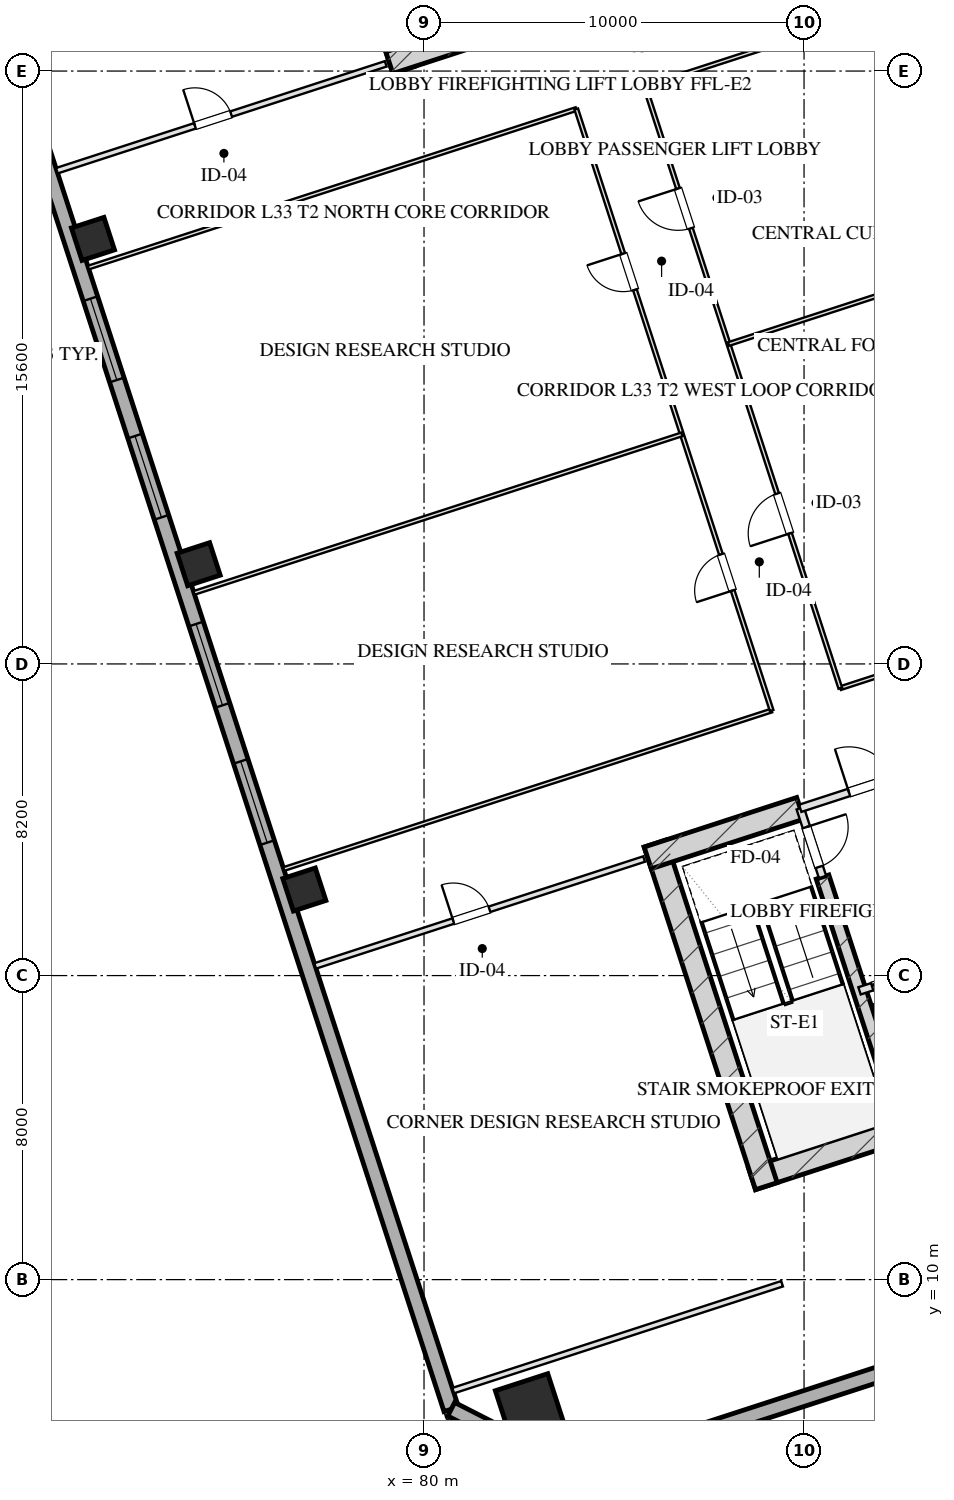
"""IFC4 building model, lengths in metres.
Left out: names, types, materials, properties, quantities, classifications, styles, units other than length and angle.
Written with IfcOpenShell. Run it as: python <this file> out.ifc"""

import sys

from ifc_helpers import new_model, si_unit, direction, frame, frame_2d, origin, origin_2d, place, context, subcontext, project, spatial, rectangle, hollow_rectangle, extrude, element, fill, save


model = new_model("IFC4")
c1 = context("Model", 3, precision=1e-05, world=origin(), true_north=direction((0.0, 1.0)))
c2 = subcontext(c1, "Body", "Model", "MODEL_VIEW")
j1 = project(units=[si_unit("LENGTHUNIT", "METRE"), si_unit("PLANEANGLEUNIT", "RADIAN")], contexts=[c1])
p1 = place(None, origin())
s1 = spatial("IfcSite", under=j1, at=p1, CompositionType="ELEMENT")
p2 = place(p1, origin())
s2 = spatial("IfcBuilding", under=s1, at=p2, CompositionType="ELEMENT")
p3 = place(p2, frame((0.0, 0.0, 127.65)))
s3 = spatial("IfcBuildingStorey", under=s2, at=p3, CompositionType="ELEMENT", Elevation=127.65)
p4 = place(p3, frame((88.63, 12.652, 0.0), z_axis=(0.0, 0.0, 1.0), x_axis=(0.95105714907, 0.309015046886, 0.0)))
e1 = element("IfcWall", 1, at=p4, inside=s3, PredefinedType="SHEAR", context=c2, shape_type="SweptSolid", body=[
    extrude(rectangle(XDim=16.4, YDim=0.6, at=frame_2d((8.2, 0.0))), origin(), (0.0, 0.0, 1.0), 3.45),
])
p5 = place(p3, frame((86.078, 21.475, 0.0), z_axis=(0.0, 0.0, 1.0), x_axis=(0.309017938678, -0.951056209472, 0.0)))
e2 = element("IfcWall", 2, at=p5, inside=s3, PredefinedType="SHEAR", context=c2, shape_type="SweptSolid", body=[
    extrude(rectangle(XDim=9.48, YDim=0.6, at=frame_2d((4.74, 0.0))), origin(), (0.0, 0.0, 1.0), 3.45),
])
p6 = place(p3, frame((90.486, 20.594, 0.0), z_axis=(0.0, 0.0, 1.0), x_axis=(0.309020428229, -0.951055400562, 0.0)))
e3 = element("IfcWall", 3, at=p6, inside=s3, PredefinedType="SHEAR", context=c2, shape_type="SweptSolid", body=[
    extrude(rectangle(XDim=6.98, YDim=0.35, at=frame_2d((3.49, 0.0))), origin(), (0.0, 0.0, 1.0), 3.45),
])
p7 = place(p3, frame((85.886, 21.097, 0.0), z_axis=(0.0, 0.0, 1.0), x_axis=(0.951068073652, 0.308981422225, 0.0)))
e4 = element("IfcWall", 4, at=p7, inside=s3, PredefinedType="SHEAR", context=c2, shape_type="SweptSolid", body=[
    extrude(rectangle(XDim=4.22, YDim=0.6, at=frame_2d((2.11, 0.0))), origin(), (0.0, 0.0, 1.0), 3.45),
])
p8 = place(p3, frame((79.466, 41.828, 0.0), z_axis=(0.0, 0.0, 1.0), x_axis=(-0.309041232772, 0.951048640421, 0.0)))
e5 = element("IfcWall", 5, at=p8, inside=s3, PredefinedType="SHEAR", context=c2, shape_type="SweptSolid", body=[
    extrude(rectangle(XDim=9.48, YDim=0.6, at=frame_2d((4.74, 0.0))), origin(), (0.0, 0.0, 1.0), 3.45),
])
p9 = place(p3, frame((79.087, 42.021, 0.0), z_axis=(0.0, 0.0, 1.0), x_axis=(0.951062550203, 0.3089984233, 0.0)))
e6 = element("IfcWall", 6, at=p9, inside=s3, PredefinedType="SHEAR", context=c2, shape_type="SweptSolid", body=[
    extrude(rectangle(XDim=4.22, YDim=0.6, at=frame_2d((2.11, 0.0))), origin(), (0.0, 0.0, 1.0), 3.45),
])
p10 = place(p3, frame((82.791, 6.612, 0.0), z_axis=(0.0, 0.0, 1.0), x_axis=(0.951056516295, 0.309016994375, 0.0)))
e7 = element("IfcColumn", 7, at=p10, inside=s3, PredefinedType="COLUMN", context=c2, shape_type="SweptSolid", body=[
    extrude(hollow_rectangle(XDim=1.45, YDim=1.45, WallThickness=0.05, at=origin_2d()), origin(), (0.0, 0.0, 1.0), 3.451),
])
for number, where, z_axis, x_axis in (
    (8, (76.851, 20.264, 0.0), (0.0, 0.0, 1.0), (0.951, 0.309, 0.0)),
    (9, (74.07, 28.824, 0.0), (0.0, 0.0, 1.0), (0.951, 0.309, 0.0)),
    (10, (71.289, 37.384, 0.0), (0.0, 0.0, 1.0), (0.951, 0.309, 0.0)),
):
    element("IfcColumn", number, at=place(p3, frame(where, z_axis=z_axis, x_axis=x_axis)), inside=s3, PredefinedType="COLUMN", context=c2, shape_type="SweptSolid", body=[
        extrude(hollow_rectangle(XDim=0.9, YDim=0.9, WallThickness=0.032, at=origin_2d()), origin(), (0.0, 0.0, 1.0), 3.451),
    ])
p11 = place(p3, frame((80.716, 6.59, 0.0), z_axis=(0.0, 0.0, 1.0), x_axis=(-0.309017542002, 0.95105633836, 0.0)))
e11 = element("IfcWall", 11, at=p11, inside=s3, PredefinedType="SOLIDWALL", context=c2, shape_type="SweptSolid", body=[
    extrude(rectangle(XDim=46.4, YDim=0.4, at=frame_2d((23.2, 0.0))), origin(), (0.0, 0.0, 1.0), 2.61),
])
p12 = place(p11, frame((15.675, 0.0, 0.75)))
e12 = element("IfcOpeningElement", 12, at=p12, cuts=e11, PredefinedType="OPENING", context=c2, shape_type="SweptSolid", body=[
    extrude(rectangle(XDim=2.25, YDim=1.46, at=frame_2d((1.125, 0.73))), frame((0.0, 0.21, 0.0), z_axis=(0.0, -1.0, 0.0), x_axis=(1.0, 0.0, 0.0)), (0.0, 0.0, 1.0), 0.42),
])
p13 = place(p11, frame((19.475, 0.0, 0.75)))
e13 = element("IfcOpeningElement", 13, at=p13, cuts=e11, PredefinedType="OPENING", context=c2, shape_type="SweptSolid", body=[
    extrude(rectangle(XDim=2.25, YDim=1.46, at=frame_2d((1.125, 0.73))), frame((0.0, 0.21, 0.0), z_axis=(0.0, -1.0, 0.0), x_axis=(1.0, 0.0, 0.0)), (0.0, 0.0, 1.0), 0.42),
])
p14 = place(p11, frame((24.675, 0.0, 0.75)))
e14 = element("IfcOpeningElement", 14, at=p14, cuts=e11, PredefinedType="OPENING", context=c2, shape_type="SweptSolid", body=[
    extrude(rectangle(XDim=2.25, YDim=1.46, at=frame_2d((1.125, 0.73))), frame((0.0, 0.21, 0.0), z_axis=(0.0, -1.0, 0.0), x_axis=(1.0, 0.0, 0.0)), (0.0, 0.0, 1.0), 0.42),
])
p15 = place(p11, frame((28.475, 0.0, 0.75)))
e15 = element("IfcOpeningElement", 15, at=p15, cuts=e11, PredefinedType="OPENING", context=c2, shape_type="SweptSolid", body=[
    extrude(rectangle(XDim=2.25, YDim=1.46, at=frame_2d((1.125, 0.73))), frame((0.0, 0.21, 0.0), z_axis=(0.0, -1.0, 0.0), x_axis=(1.0, 0.0, 0.0)), (0.0, 0.0, 1.0), 0.42),
])
p16 = place(p3, frame((111.953, 14.005, 0.0), z_axis=(0.0, 0.0, 1.0), x_axis=(-0.95105505922, -0.309021478754, 0.0)))
e16 = element("IfcWall", 16, at=p16, inside=s3, PredefinedType="SOLIDWALL", context=c2, shape_type="SweptSolid", body=[
    extrude(rectangle(XDim=29.4, YDim=0.4, at=frame_2d((14.7, 0.0))), origin(), (0.0, 0.0, 1.0), 2.61),
])
p17 = place(p3, frame((83.992, 4.92, 0.0), z_axis=(0.0, 0.0, 1.0), x_axis=(-0.891001999643, 0.45399937955, 0.0)))
e17 = element("IfcWall", 17, at=p17, inside=s3, PredefinedType="SOLIDWALL", context=c2, shape_type="SweptSolid", body=[
    extrude(rectangle(XDim=3.677, YDim=0.4, at=frame_2d((1.839, 0.0))), origin(), (0.0, 0.0, 1.0), 2.61),
])
p18 = place(p3, frame((89.899, 22.401, 0.0), z_axis=(0.0, 0.0, 1.0), x_axis=(0.308932062672, -0.951084108086, 0.0)))
e18 = element("IfcWall", 18, at=p18, inside=s3, PredefinedType="PARTITIONING", context=c2, shape_type="SweptSolid", body=[
    extrude(rectangle(XDim=1.9, YDim=0.2, at=frame_2d((0.95, 0.0))), origin(), (0.0, 0.0, 1.0), 3.175),
])
p19 = place(p18, frame((0.52, 0.0, 0.0)))
e19 = element("IfcOpeningElement", 19, at=p19, cuts=e18, PredefinedType="OPENING", context=c2, shape_type="SweptSolid", body=[
    extrude(rectangle(XDim=1.1, YDim=2.05, at=frame_2d((0.55, 1.025))), frame((0.0, 0.11, 0.0), z_axis=(0.0, -1.0, 0.0), x_axis=(1.0, 0.0, 0.0)), (0.0, 0.0, 1.0), 0.22),
])
p20 = place(p3, frame((89.899, 22.401, 0.0), z_axis=(0.0, 0.0, 1.0), x_axis=(0.951046716504, 0.309047153403, 0.0)))
e20 = element("IfcWall", 20, at=p20, inside=s3, PredefinedType="PARTITIONING", context=c2, shape_type="SweptSolid", body=[
    extrude(rectangle(XDim=3.83, YDim=0.2, at=frame_2d((1.915, 0.0))), origin(), (0.0, 0.0, 1.0), 3.175),
])
p21 = place(p20, frame((1.35, 0.0, 0.0)))
e21 = element("IfcOpeningElement", 21, at=p21, cuts=e20, PredefinedType="OPENING", context=c2, shape_type="SweptSolid", body=[
    extrude(rectangle(XDim=1.2, YDim=2.05, at=frame_2d((0.6, 1.025))), frame((0.0, 0.11, 0.0), z_axis=(0.0, -1.0, 0.0), x_axis=(1.0, 0.0, 0.0)), (0.0, 0.0, 1.0), 0.22),
])
p22 = place(p3, frame((91.46, 17.598, 0.0), z_axis=(0.0, 0.0, 1.0), x_axis=(0.951062257173, 0.308999325213, 0.0)))
e22 = element("IfcWall", 22, at=p22, inside=s3, PredefinedType="PARTITIONING", context=c2, shape_type="SweptSolid", body=[
    extrude(rectangle(XDim=2.1, YDim=0.2, at=frame_2d((1.05, 0.0))), origin(), (0.0, 0.0, 1.0), 3.175),
])
p23 = place(p22, frame((0.35, 0.0, 0.0)))
e23 = element("IfcOpeningElement", 23, at=p23, cuts=e22, PredefinedType="OPENING", context=c2, shape_type="SweptSolid", body=[
    extrude(rectangle(XDim=1.1, YDim=2.05, at=frame_2d((0.55, 1.025))), frame((0.0, 0.11, 0.0), z_axis=(0.0, -1.0, 0.0), x_axis=(1.0, 0.0, 0.0)), (0.0, 0.0, 1.0), 0.22),
])
p24 = place(p3, frame((80.767, 7.079, 0.0), z_axis=(0.0, 0.0, 1.0), x_axis=(0.951057133767, 0.309015093986, 0.0)))
e24 = element("IfcWall", 24, at=p24, inside=s3, PredefinedType="PARTITIONING", context=c2, shape_type="SweptSolid", body=[
    extrude(rectangle(XDim=9.1, YDim=0.15, at=frame_2d((4.55, 0.0))), origin(), (0.0, 0.0, 1.0), 3.175),
])
p25 = place(p3, frame((77.136, 18.254, 0.0), z_axis=(0.0, 0.0, 1.0), x_axis=(0.951057133767, 0.309015093986, 0.0)))
e25 = element("IfcWall", 25, at=p25, inside=s3, PredefinedType="PARTITIONING", context=c2, shape_type="SweptSolid", body=[
    extrude(rectangle(XDim=9.1, YDim=0.15, at=frame_2d((4.55, 0.0))), origin(), (0.0, 0.0, 1.0), 3.175),
])
p26 = place(p25, frame((3.822, 0.0, 0.0)))
e26 = element("IfcOpeningElement", 26, at=p26, cuts=e25, PredefinedType="OPENING", context=c2, shape_type="SweptSolid", body=[
    extrude(rectangle(XDim=1.0, YDim=2.05, at=frame_2d((0.5, 1.025))), frame((0.0, 0.085, 0.0), z_axis=(0.0, -1.0, 0.0), x_axis=(1.0, 0.0, 0.0)), (0.0, 0.0, 1.0), 0.17),
])
p27 = place(p3, frame((70.338, 39.177, 0.0), z_axis=(0.0, 0.0, 1.0), x_axis=(0.951059695568, 0.309007209409, 0.0)))
e27 = element("IfcWall", 27, at=p27, inside=s3, PredefinedType="PARTITIONING", context=c2, shape_type="SweptSolid", body=[
    extrude(rectangle(XDim=9.1, YDim=0.15, at=frame_2d((4.55, 0.0))), origin(), (0.0, 0.0, 1.0), 3.175),
])
p28 = place(p27, frame((3.822, 0.0, 0.0)))
e28 = element("IfcOpeningElement", 28, at=p28, cuts=e27, PredefinedType="OPENING", context=c2, shape_type="SweptSolid", body=[
    extrude(rectangle(XDim=1.0, YDim=2.05, at=frame_2d((0.5, 1.025))), frame((0.0, 0.085, 0.0), z_axis=(0.0, -1.0, 0.0), x_axis=(1.0, 0.0, 0.0)), (0.0, 0.0, 1.0), 0.17),
])
p29 = place(p3, frame((76.308, 20.803, 0.0), z_axis=(0.0, 0.0, 1.0), x_axis=(0.951054001411, 0.309024734286, 0.0)))
e29 = element("IfcWall", 29, at=p29, inside=s3, PredefinedType="MOVABLE", context=c2, shape_type="SweptSolid", body=[
    extrude(rectangle(XDim=13.5, YDim=0.1, at=frame_2d((6.75, 0.0))), origin(), (0.0, 0.0, 1.0), 3.175),
])
p30 = place(p3, frame((90.954, 25.562, 0.0), z_axis=(0.0, 0.0, 1.0), x_axis=(0.951052398814, 0.309029666393, 0.0)))
e30 = element("IfcWall", 30, at=p30, inside=s3, PredefinedType="MOVABLE", context=c2, shape_type="SweptSolid", body=[
    extrude(rectangle(XDim=9.2, YDim=0.1, at=frame_2d((4.6, 0.0))), origin(), (0.0, 0.0, 1.0), 3.175),
])
p31 = place(p3, frame((71.166, 36.629, 0.0), z_axis=(0.0, 0.0, 1.0), x_axis=(0.951057589409, 0.309013691651, 0.0)))
e31 = element("IfcWall", 31, at=p31, inside=s3, PredefinedType="MOVABLE", context=c2, shape_type="SweptSolid", body=[
    extrude(rectangle(XDim=13.5, YDim=0.1, at=frame_2d((6.75, 0.0))), origin(), (0.0, 0.0, 1.0), 3.175),
])
p32 = place(p3, frame((85.812, 41.387, 0.0), z_axis=(0.0, 0.0, 1.0), x_axis=(0.951054933035, 0.309021867106, 0.0)))
e32 = element("IfcWall", 32, at=p32, inside=s3, PredefinedType="MOVABLE", context=c2, shape_type="SweptSolid", body=[
    extrude(rectangle(XDim=9.2, YDim=0.1, at=frame_2d((4.6, 0.0))), origin(), (0.0, 0.0, 1.0), 3.175),
])
p33 = place(p3, frame((89.147, 24.975, 0.0), z_axis=(0.0, 0.0, 1.0), x_axis=(-0.309022042254, 0.951054876125, 0.0)))
e33 = element("IfcWall", 33, at=p33, inside=s3, PredefinedType="MOVABLE", context=c2, shape_type="SweptSolid", body=[
    extrude(rectangle(XDim=16.64, YDim=0.1, at=frame_2d((8.32, 0.0))), origin(), (0.0, 0.0, 1.0), 3.175),
])
p34 = place(p33, frame((3.32, 0.0, 0.0)))
e34 = element("IfcOpeningElement", 34, at=p34, cuts=e33, PredefinedType="OPENING", context=c2, shape_type="SweptSolid", body=[
    extrude(rectangle(XDim=1.0, YDim=2.05, at=frame_2d((0.5, 1.025))), frame((0.0, 0.06, 0.0), z_axis=(0.0, -1.0, 0.0), x_axis=(1.0, 0.0, 0.0)), (0.0, 0.0, 1.0), 0.12),
])
p35 = place(p33, frame((11.64, 0.0, 0.0)))
e35 = element("IfcOpeningElement", 35, at=p35, cuts=e33, PredefinedType="OPENING", context=c2, shape_type="SweptSolid", body=[
    extrude(rectangle(XDim=1.0, YDim=2.05, at=frame_2d((0.5, 1.025))), frame((0.0, 0.06, 0.0), z_axis=(0.0, -1.0, 0.0), x_axis=(1.0, 0.0, 0.0)), (0.0, 0.0, 1.0), 0.12),
])
p36 = place(p3, frame((90.954, 25.562, 0.0), z_axis=(0.0, 0.0, 1.0), x_axis=(-0.30901773025, 0.951056277195, 0.0)))
e36 = element("IfcWall", 36, at=p36, inside=s3, PredefinedType="MOVABLE", context=c2, shape_type="SweptSolid", body=[
    extrude(rectangle(XDim=16.64, YDim=0.1, at=frame_2d((8.32, 0.0))), origin(), (0.0, 0.0, 1.0), 3.175),
])
p37 = place(p36, frame((4.284, 0.0, 0.0)))
e37 = element("IfcOpeningElement", 37, at=p37, cuts=e36, PredefinedType="OPENING", context=c2, shape_type="SweptSolid", body=[
    extrude(rectangle(XDim=1.1, YDim=2.05, at=frame_2d((0.55, 1.025))), frame((0.0, 0.06, 0.0), z_axis=(0.0, -1.0, 0.0), x_axis=(1.0, 0.0, 0.0)), (0.0, 0.0, 1.0), 0.12),
])
p38 = place(p36, frame((12.724, 0.0, 0.0)))
e38 = element("IfcOpeningElement", 38, at=p38, cuts=e36, PredefinedType="OPENING", context=c2, shape_type="SweptSolid", body=[
    extrude(rectangle(XDim=1.1, YDim=2.05, at=frame_2d((0.55, 1.025))), frame((0.0, 0.06, 0.0), z_axis=(0.0, -1.0, 0.0), x_axis=(1.0, 0.0, 0.0)), (0.0, 0.0, 1.0), 0.12),
])
p39 = place(p3, frame((88.012, 34.616, 0.0), z_axis=(0.0, 0.0, 1.0), x_axis=(0.951054933035, 0.309021867106, 0.0)))
e39 = element("IfcWall", 39, at=p39, inside=s3, PredefinedType="MOVABLE", context=c2, shape_type="SweptSolid", body=[
    extrude(rectangle(XDim=9.2, YDim=0.1, at=frame_2d((4.6, 0.0))), origin(), (0.0, 0.0, 1.0), 3.175),
])
p40 = place(p3, frame((73.947, 28.069, 0.0), z_axis=(0.0, 0.0, 1.0), x_axis=(0.951059316265, 0.309008376821, 0.0)))
e40 = element("IfcWall", 40, at=p40, inside=s3, PredefinedType="MOVABLE", context=c2, shape_type="SweptSolid", body=[
    extrude(rectangle(XDim=13.5, YDim=0.1, at=frame_2d((6.75, 0.0))), origin(), (0.0, 0.0, 1.0), 3.175),
])
p41 = place(p12, origin())
e41 = element("IfcWindow", 41, at=p41, inside=s3, PartitioningType="TRIPLE_PANEL_VERTICAL", PredefinedType="WINDOW", context=c2, shape_type="SweptSolid", body=[
    extrude(rectangle(XDim=2.25, YDim=1.46, at=frame_2d((1.125, 0.73))), frame((0.0, 0.03, 0.0), z_axis=(0.0, -1.0, 0.0), x_axis=(1.0, 0.0, 0.0)), (0.0, 0.0, 1.0), 0.06),
])
fill(e12, e41)
p42 = place(p13, origin())
e42 = element("IfcWindow", 42, at=p42, inside=s3, PartitioningType="TRIPLE_PANEL_VERTICAL", PredefinedType="WINDOW", context=c2, shape_type="SweptSolid", body=[
    extrude(rectangle(XDim=2.25, YDim=1.46, at=frame_2d((1.125, 0.73))), frame((0.0, 0.03, 0.0), z_axis=(0.0, -1.0, 0.0), x_axis=(1.0, 0.0, 0.0)), (0.0, 0.0, 1.0), 0.06),
])
fill(e13, e42)
p43 = place(p14, origin())
e43 = element("IfcWindow", 43, at=p43, inside=s3, PartitioningType="TRIPLE_PANEL_VERTICAL", PredefinedType="WINDOW", context=c2, shape_type="SweptSolid", body=[
    extrude(rectangle(XDim=2.25, YDim=1.46, at=frame_2d((1.125, 0.73))), frame((0.0, 0.03, 0.0), z_axis=(0.0, -1.0, 0.0), x_axis=(1.0, 0.0, 0.0)), (0.0, 0.0, 1.0), 0.06),
])
fill(e14, e43)
p44 = place(p15, origin())
e44 = element("IfcWindow", 44, at=p44, inside=s3, PartitioningType="TRIPLE_PANEL_VERTICAL", PredefinedType="WINDOW", context=c2, shape_type="SweptSolid", body=[
    extrude(rectangle(XDim=2.25, YDim=1.46, at=frame_2d((1.125, 0.73))), frame((0.0, 0.03, 0.0), z_axis=(0.0, -1.0, 0.0), x_axis=(1.0, 0.0, 0.0)), (0.0, 0.0, 1.0), 0.06),
])
fill(e15, e44)
p45 = place(p19, origin())
e45 = element("IfcDoor", 45, at=p45, inside=s3, OperationType="SINGLE_SWING_LEFT", PredefinedType="DOOR", context=c2, shape_type="SweptSolid", body=[
    extrude(rectangle(XDim=1.1, YDim=2.05, at=frame_2d((0.55, 1.025))), frame((0.0, 0.025, 0.0), z_axis=(0.0, -1.0, 0.0), x_axis=(1.0, 0.0, 0.0)), (0.0, 0.0, 1.0), 0.05),
])
fill(e19, e45)
p46 = place(p21, origin())
e46 = element("IfcDoor", 46, at=p46, inside=s3, OperationType="SINGLE_SWING_LEFT", PredefinedType="DOOR", context=c2, shape_type="SweptSolid", body=[
    extrude(rectangle(XDim=1.2, YDim=2.05, at=frame_2d((0.6, 1.025))), frame((0.0, 0.025, 0.0), z_axis=(0.0, -1.0, 0.0), x_axis=(1.0, 0.0, 0.0)), (0.0, 0.0, 1.0), 0.05),
])
fill(e21, e46)
p47 = place(p23, origin())
e47 = element("IfcDoor", 47, at=p47, inside=s3, OperationType="DOUBLE_DOOR_SLIDING", PredefinedType="DOOR", context=c2, shape_type="SweptSolid", body=[
    extrude(rectangle(XDim=1.1, YDim=2.05, at=frame_2d((0.55, 1.025))), frame((0.0, 0.025, 0.0), z_axis=(0.0, -1.0, 0.0), x_axis=(1.0, 0.0, 0.0)), (0.0, 0.0, 1.0), 0.05),
])
fill(e23, e47)
p48 = place(p26, origin())
e48 = element("IfcDoor", 48, at=p48, inside=s3, OperationType="SINGLE_SWING_LEFT", PredefinedType="DOOR", context=c2, shape_type="SweptSolid", body=[
    extrude(rectangle(XDim=1.0, YDim=2.05, at=frame_2d((0.5, 1.025))), frame((0.0, 0.025, 0.0), z_axis=(0.0, -1.0, 0.0), x_axis=(1.0, 0.0, 0.0)), (0.0, 0.0, 1.0), 0.05),
])
fill(e26, e48)
p49 = place(p28, origin())
e49 = element("IfcDoor", 49, at=p49, inside=s3, OperationType="SINGLE_SWING_LEFT", PredefinedType="DOOR", context=c2, shape_type="SweptSolid", body=[
    extrude(rectangle(XDim=1.0, YDim=2.05, at=frame_2d((0.5, 1.025))), frame((0.0, 0.025, 0.0), z_axis=(0.0, -1.0, 0.0), x_axis=(1.0, 0.0, 0.0)), (0.0, 0.0, 1.0), 0.05),
])
fill(e28, e49)
p50 = place(p34, origin())
e50 = element("IfcDoor", 50, at=p50, inside=s3, OperationType="SINGLE_SWING_LEFT", PredefinedType="DOOR", context=c2, shape_type="SweptSolid", body=[
    extrude(rectangle(XDim=1.0, YDim=2.05, at=frame_2d((0.5, 1.025))), frame((0.0, 0.025, 0.0), z_axis=(0.0, -1.0, 0.0), x_axis=(1.0, 0.0, 0.0)), (0.0, 0.0, 1.0), 0.05),
])
fill(e34, e50)
p51 = place(p35, origin())
e51 = element("IfcDoor", 51, at=p51, inside=s3, OperationType="SINGLE_SWING_RIGHT", PredefinedType="DOOR", context=c2, shape_type="SweptSolid", body=[
    extrude(rectangle(XDim=1.0, YDim=2.05, at=frame_2d((0.5, 1.025))), frame((0.0, 0.025, 0.0), z_axis=(0.0, -1.0, 0.0), x_axis=(1.0, 0.0, 0.0)), (0.0, 0.0, 1.0), 0.05),
])
fill(e35, e51)
p52 = place(p37, origin())
e52 = element("IfcDoor", 52, at=p52, inside=s3, OperationType="SINGLE_SWING_LEFT", PredefinedType="DOOR", context=c2, shape_type="SweptSolid", body=[
    extrude(rectangle(XDim=1.1, YDim=2.05, at=frame_2d((0.55, 1.025))), frame((0.0, 0.025, 0.0), z_axis=(0.0, -1.0, 0.0), x_axis=(1.0, 0.0, 0.0)), (0.0, 0.0, 1.0), 0.05),
])
fill(e37, e52)
p53 = place(p38, origin())
e53 = element("IfcDoor", 53, at=p53, inside=s3, OperationType="SINGLE_SWING_RIGHT", PredefinedType="DOOR", context=c2, shape_type="SweptSolid", body=[
    extrude(rectangle(XDim=1.1, YDim=2.05, at=frame_2d((0.55, 1.025))), frame((0.0, 0.025, 0.0), z_axis=(0.0, -1.0, 0.0), x_axis=(1.0, 0.0, 0.0)), (0.0, 0.0, 1.0), 0.05),
])
fill(e38, e53)
save(model, sys.argv[1])
